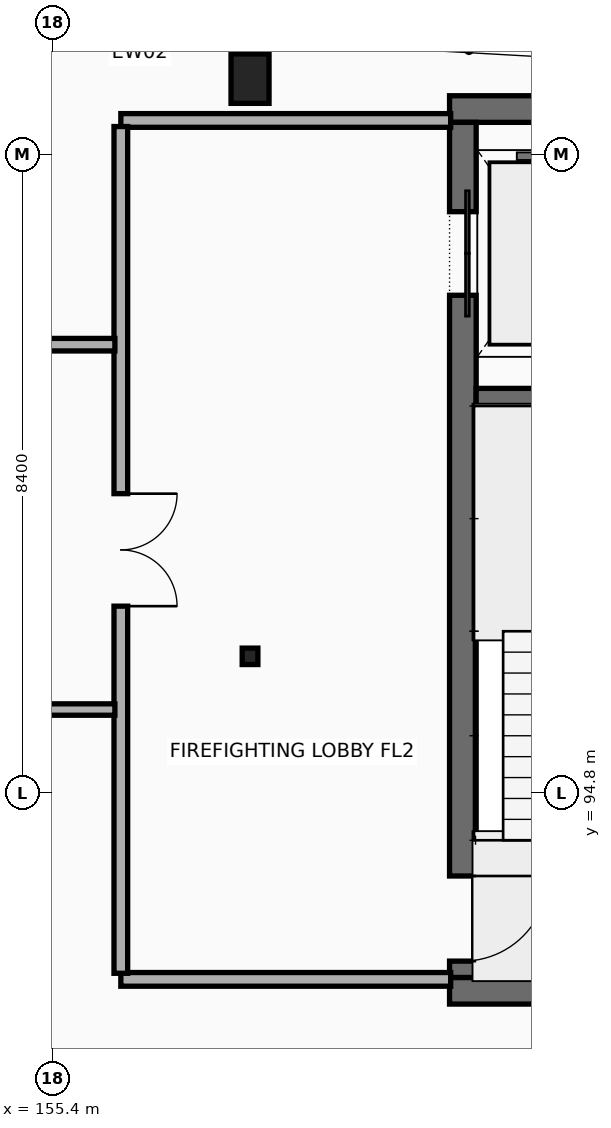
"""IFC4 building model, lengths in metres.
Left out: names, types, materials, properties, quantities, classifications, styles, units other than length and angle.
Written with IfcOpenShell. Run it as: python <this file> out.ifc"""

import sys

from ifc_helpers import new_model, si_unit, direction, frame, frame_2d, origin, origin_2d, place, context, subcontext, project, spatial, rectangle, i_section, extrude, element, fill, save


model = new_model("IFC4")
c1 = context("Model", 3, precision=1e-05, world=origin(), true_north=direction((0.0, 1.0)))
c2 = subcontext(c1, "Body", "Model", "MODEL_VIEW")
j1 = project(units=[si_unit("LENGTHUNIT", "METRE"), si_unit("PLANEANGLEUNIT", "RADIAN")], contexts=[c1])
p1 = place(None, origin())
s1 = spatial("IfcSite", under=j1, at=p1, CompositionType="ELEMENT")
p2 = place(p1, origin())
s2 = spatial("IfcBuilding", under=s1, at=p2, CompositionType="ELEMENT")
p3 = place(p2, frame((0.0, 0.0, 12.6)))
s3 = spatial("IfcBuildingStorey", under=s2, at=p3, CompositionType="ELEMENT", Elevation=12.6)
for number, where, z_axis, x_axis in (
    (1, (160.625, 92.2, 0.0), (0.0, 0.0, 1.0), (1.0, 0.0, 0.0)),
    (2, (165.375, 103.8, 0.0), (0.0, 0.0, 1.0), (-1.0, 0.0, 0.0)),
):
    element("IfcWall", number, at=place(p3, frame(where, z_axis=z_axis, x_axis=x_axis)), inside=s3, PredefinedType="SHEAR", context=c2, shape_type="SweptSolid", body=[
        extrude(rectangle(XDim=4.75, YDim=0.35, at=frame_2d((2.375, 0.0))), origin(), (0.0, 0.0, 1.0), 3.6),
    ])
p4 = place(p3, frame((160.8, 103.625, 0.0), z_axis=(0.0, 0.0, 1.0), x_axis=(0.0, -1.0, 0.0)))
e3 = element("IfcWall", 3, at=p4, inside=s3, PredefinedType="SHEAR", context=c2, shape_type="SweptSolid", body=[
    extrude(rectangle(XDim=11.25, YDim=0.35, at=frame_2d((5.625, 0.0))), origin(), (0.0, 0.0, 1.0), 3.6),
])
p5 = place(p4, frame((1.175, 0.0, 0.0)))
e4 = element("IfcOpeningElement", 4, at=p5, cuts=e3, PredefinedType="OPENING", context=c2, shape_type="SweptSolid", body=[
    extrude(rectangle(XDim=1.1, YDim=2.2, at=frame_2d((0.55, 1.1))), frame((0.0, 0.185, 0.0), z_axis=(0.0, -1.0, 0.0), x_axis=(1.0, 0.0, 0.0)), (0.0, 0.0, 1.0), 0.37),
])
p6 = place(p4, frame((9.915, 0.0, 0.0)))
e5 = element("IfcOpeningElement", 5, at=p6, cuts=e3, PredefinedType="OPENING", context=c2, shape_type="SweptSolid", body=[
    extrude(rectangle(XDim=1.12, YDim=2.16, at=frame_2d((0.56, 1.08))), frame((0.0, 0.185, 0.0), z_axis=(0.0, -1.0, 0.0), x_axis=(1.0, 0.0, 0.0)), (0.0, 0.0, 1.0), 0.37),
])
p7 = place(p3, frame((160.975, 100.0, 0.0), z_axis=(0.0, 0.0, 1.0), x_axis=(1.0, 0.0, 0.0)))
e6 = element("IfcWall", 6, at=p7, inside=s3, PredefinedType="SHEAR", context=c2, shape_type="SweptSolid", body=[
    extrude(rectangle(XDim=4.05, YDim=0.25, at=frame_2d((2.025, 0.0))), origin(), (0.0, 0.0, 1.0), 3.6),
])
p8 = place(p3, frame((158.0, 96.6, 0.0), z_axis=(0.0, 0.0, 1.0), x_axis=(1.0, 0.0, 0.0)))
e7 = element("IfcColumn", 7, at=p8, inside=s3, PredefinedType="COLUMN", context=c2, shape_type="SweptSolid", body=[
    extrude(i_section(OverallWidth=0.206, OverallDepth=0.216, WebThickness=0.01, FlangeThickness=0.017, at=origin_2d()), origin(), (0.0, 0.0, 1.0), 3.6),
])
p9 = place(p3, frame((158.0, 104.2, 0.0), z_axis=(0.0, 0.0, 1.0), x_axis=(1.0, 0.0, 0.0)))
e8 = element("IfcColumn", 8, at=p9, inside=s3, PredefinedType="COLUMN", context=c2, shape_type="SweptSolid", body=[
    extrude(rectangle(XDim=0.5, YDim=0.65, at=origin_2d()), origin(), (0.0, 0.0, 1.0), 3.6),
])
p10 = place(p3, frame((156.3, 92.35, 0.0), z_axis=(0.0, 0.0, 1.0), x_axis=(1.0, 0.0, 0.0)))
e9 = element("IfcWall", 9, at=p10, inside=s3, PredefinedType="PARTITIONING", context=c2, shape_type="SweptSolid", body=[
    extrude(rectangle(XDim=4.34, YDim=0.18, at=frame_2d((2.17, 0.0))), origin(), (0.0, 0.0, 1.0), 2.882),
])
p11 = place(p3, frame((160.64, 103.65, 0.0), z_axis=(0.0, 0.0, 1.0), x_axis=(-1.0, 0.0, 0.0)))
e10 = element("IfcWall", 10, at=p11, inside=s3, PredefinedType="PARTITIONING", context=c2, shape_type="SweptSolid", body=[
    extrude(rectangle(XDim=4.34, YDim=0.18, at=frame_2d((2.17, 0.0))), origin(), (0.0, 0.0, 1.0), 2.812),
])
p12 = place(p3, frame((156.3, 103.57, 0.0), z_axis=(0.0, 0.0, 1.0), x_axis=(0.0, -1.0, 0.0)))
e11 = element("IfcWall", 11, at=p12, inside=s3, PredefinedType="PARTITIONING", context=c2, shape_type="SweptSolid", body=[
    extrude(rectangle(XDim=11.14, YDim=0.18, at=frame_2d((5.57, 0.0))), origin(), (0.0, 0.0, 1.0), 2.662),
])
p13 = place(p12, frame((4.83, 0.0, 0.0)))
e12 = element("IfcOpeningElement", 12, at=p13, cuts=e11, PredefinedType="OPENING", context=c2, shape_type="SweptSolid", body=[
    extrude(rectangle(XDim=1.48, YDim=2.22, at=frame_2d((0.74, 1.11))), frame((0.0, 0.1, 0.0), z_axis=(0.0, -1.0, 0.0), x_axis=(1.0, 0.0, 0.0)), (0.0, 0.0, 1.0), 0.2),
])
p14 = place(p3, frame((143.406, 95.9, 0.0), z_axis=(0.0, 0.0, 1.0), x_axis=(1.0, 0.0, 0.0)))
e13 = element("IfcWall", 13, at=p14, inside=s3, PredefinedType="PARTITIONING", context=c2, shape_type="SweptSolid", body=[
    extrude(rectangle(XDim=12.816, YDim=0.15, at=frame_2d((6.408, 0.0))), origin(), (0.0, 0.0, 1.0), 2.733),
])
p15 = place(p3, frame((144.318, 100.7, 0.0), z_axis=(0.0, 0.0, 1.0), x_axis=(1.0, 0.0, 0.0)))
e14 = element("IfcWall", 14, at=p15, inside=s3, PredefinedType="PARTITIONING", context=c2, shape_type="SweptSolid", body=[
    extrude(rectangle(XDim=11.904, YDim=0.165, at=frame_2d((5.952, 0.0))), origin(), (0.0, 0.0, 1.0), 2.642),
])
p16 = place(p5, origin())
e15 = element("IfcDoor", 15, at=p16, inside=s3, OperationType="DOUBLE_DOOR_SLIDING", PredefinedType="DOOR", context=c2, shape_type="SweptSolid", body=[
    extrude(rectangle(XDim=1.1, YDim=2.2, at=frame_2d((0.55, 1.1))), frame((0.0, 0.025, 0.0), z_axis=(0.0, -1.0, 0.0), x_axis=(1.0, 0.0, 0.0)), (0.0, 0.0, 1.0), 0.05),
])
fill(e4, e15)
p17 = place(p6, origin())
e16 = element("IfcDoor", 16, at=p17, inside=s3, OperationType="SINGLE_SWING_LEFT", PredefinedType="DOOR", context=c2, shape_type="SweptSolid", body=[
    extrude(rectangle(XDim=1.12, YDim=2.16, at=frame_2d((0.56, 1.08))), frame((0.0, 0.025, 0.0), z_axis=(0.0, -1.0, 0.0), x_axis=(1.0, 0.0, 0.0)), (0.0, 0.0, 1.0), 0.05),
])
fill(e5, e16)
p18 = place(p13, origin())
e17 = element("IfcDoor", 17, at=p18, inside=s3, OperationType="DOUBLE_DOOR_SINGLE_SWING", PredefinedType="DOOR", context=c2, shape_type="SweptSolid", body=[
    extrude(rectangle(XDim=1.48, YDim=2.22, at=frame_2d((0.74, 1.11))), frame((0.0, 0.025, 0.0), z_axis=(0.0, -1.0, 0.0), x_axis=(1.0, 0.0, 0.0)), (0.0, 0.0, 1.0), 0.05),
])
fill(e12, e17)
save(model, sys.argv[1])
